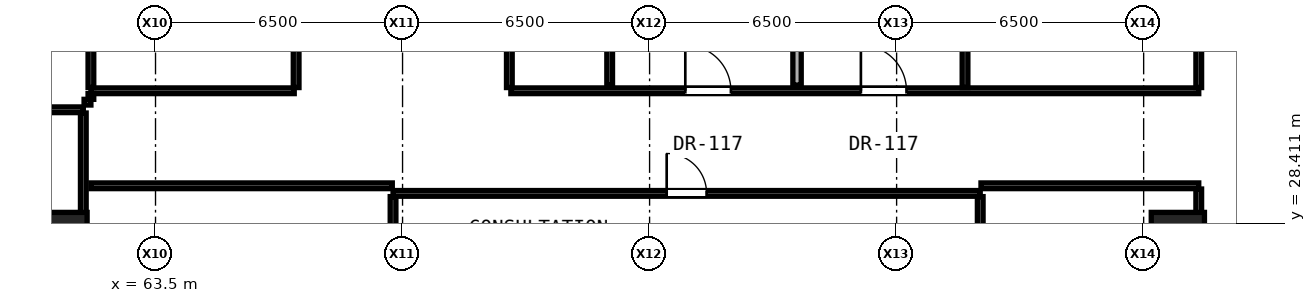
"""IFC4 building model, lengths in metres.
Left out: names, types, materials, properties, quantities, classifications, styles, units other than length and angle.
Written with IfcOpenShell. Run it as: python <this file> out.ifc"""

import sys

from ifc_helpers import new_model, si_unit, direction, frame, frame_2d, origin, origin_2d, place, context, subcontext, project, spatial, rectangle, hollow_rectangle, extrude, element, fill, save


model = new_model("IFC4")
c1 = context("Model", 3, precision=1e-05, world=origin(), true_north=direction((0.0, 1.0)))
c2 = subcontext(c1, "Body", "Model", "MODEL_VIEW")
j1 = project(units=[si_unit("LENGTHUNIT", "METRE"), si_unit("PLANEANGLEUNIT", "RADIAN")], contexts=[c1])
p1 = place(None, origin())
s1 = spatial("IfcSite", under=j1, at=p1, CompositionType="ELEMENT")
p2 = place(p1, origin())
s2 = spatial("IfcBuilding", under=s1, at=p2, CompositionType="ELEMENT")
p3 = place(p2, frame((0.0, 0.0, 18.1)))
s3 = spatial("IfcBuildingStorey", under=s2, at=p3, CompositionType="ELEMENT", Elevation=18.1)
for number, where, z_axis, x_axis in (
    (1, (61.0, 28.0, 0.0), (0.0, 0.0, 1.0), (1.0, 0.0, 0.0)),
    (2, (90.4, 28.0, 0.0), (0.0, 0.0, 1.0), (1.0, 0.0, 0.0)),
):
    element("IfcColumn", number, at=place(p3, frame(where, z_axis=z_axis, x_axis=x_axis)), inside=s3, PredefinedType="COLUMN", context=c2, shape_type="SweptSolid", body=[
        extrude(hollow_rectangle(XDim=1.4, YDim=1.4, WallThickness=0.08, at=origin_2d()), origin(), (0.0, 0.0, 1.0), 4.3),
    ])
p4 = place(p3, frame((69.75, 29.2, 0.0), z_axis=(0.0, 0.0, 1.0), x_axis=(1.0, 0.0, 0.0)))
e3 = element("IfcWall", 3, at=p4, inside=s3, PredefinedType="PARTITIONING", context=c2, shape_type="SweptSolid", body=[
    extrude(rectangle(XDim=15.45, YDim=0.15, at=frame_2d((7.725, 0.0))), origin(), (0.0, 0.0, 1.0), 2.715),
])
p5 = place(p4, frame((7.2, 0.0, 0.0)))
e4 = element("IfcOpeningElement", 4, at=p5, cuts=e3, PredefinedType="OPENING", context=c2, shape_type="SweptSolid", body=[
    extrude(rectangle(XDim=1.05, YDim=2.2, at=frame_2d((0.525, 1.1))), frame((0.0, 0.085, 0.0), z_axis=(0.0, -1.0, 0.0), x_axis=(1.0, 0.0, 0.0)), (0.0, 0.0, 1.0), 0.17),
])
p6 = place(p3, frame((61.8, 29.4, 0.0), z_axis=(0.0, 0.0, 1.0), x_axis=(1.0, 0.0, 0.0)))
e5 = element("IfcWall", 5, at=p6, inside=s3, PredefinedType="PARTITIONING", context=c2, shape_type="SweptSolid", body=[
    extrude(rectangle(XDim=7.93, YDim=0.15, at=frame_2d((3.965, 0.0))), origin(), (0.0, 0.0, 1.0), 2.715),
])
p7 = place(p3, frame((85.22, 29.4, 0.0), z_axis=(0.0, 0.0, 1.0), x_axis=(1.0, 0.0, 0.0)))
e6 = element("IfcWall", 6, at=p7, inside=s3, PredefinedType="PARTITIONING", context=c2, shape_type="SweptSolid", body=[
    extrude(rectangle(XDim=5.73, YDim=0.15, at=frame_2d((2.865, 0.0))), origin(), (0.0, 0.0, 1.0), 2.786),
])
p8 = place(p3, frame((54.0, 31.4, 0.0), z_axis=(0.0, 0.0, 1.0), x_axis=(1.0, 0.0, 0.0)))
e7 = element("IfcWall", 7, at=p8, inside=s3, PredefinedType="PARTITIONING", context=c2, shape_type="SweptSolid", body=[
    extrude(rectangle(XDim=7.6, YDim=0.15, at=frame_2d((3.8, 0.0))), origin(), (0.0, 0.0, 1.0), 2.602),
])
p9 = place(p8, frame((3.2, 0.0, 0.0)))
e8 = element("IfcOpeningElement", 8, at=p9, cuts=e7, PredefinedType="OPENING", context=c2, shape_type="SweptSolid", body=[
    extrude(rectangle(XDim=1.2, YDim=2.25, at=frame_2d((0.6, 1.125))), frame((0.0, 0.085, 0.0), z_axis=(0.0, -1.0, 0.0), x_axis=(1.0, 0.0, 0.0)), (0.0, 0.0, 1.0), 0.17),
])
p10 = place(p3, frame((61.62, 31.6, 0.0), z_axis=(0.0, 0.0, 1.0), x_axis=(1.0, 0.0, 0.0)))
e9 = element("IfcWall", 9, at=p10, inside=s3, PredefinedType="PARTITIONING", context=c2, shape_type="SweptSolid", body=[
    extrude(rectangle(XDim=0.18, YDim=0.15, at=frame_2d((0.09, 0.0))), origin(), (0.0, 0.0, 1.0), 3.65),
])
p11 = place(p3, frame((61.8, 31.9, 0.0), z_axis=(0.0, 0.0, 1.0), x_axis=(1.0, 0.0, 0.0)))
e10 = element("IfcWall", 10, at=p11, inside=s3, PredefinedType="PARTITIONING", context=c2, shape_type="SweptSolid", body=[
    extrude(rectangle(XDim=5.35, YDim=0.15, at=frame_2d((2.675, 0.0))), origin(), (0.0, 0.0, 1.0), 3.65),
])
p12 = place(p3, frame((72.85, 31.9, 0.0), z_axis=(0.0, 0.0, 1.0), x_axis=(1.0, 0.0, 0.0)))
e11 = element("IfcWall", 11, at=p12, inside=s3, PredefinedType="PARTITIONING", context=c2, shape_type="SweptSolid", body=[
    extrude(rectangle(XDim=18.1, YDim=0.15, at=frame_2d((9.05, 0.0))), origin(), (0.0, 0.0, 1.0), 2.715),
])
p13 = place(p12, frame((9.21, 0.0, 0.0)))
e12 = element("IfcOpeningElement", 12, at=p13, cuts=e11, PredefinedType="OPENING", context=c2, shape_type="SweptSolid", body=[
    extrude(rectangle(XDim=1.2, YDim=2.25, at=frame_2d((0.6, 1.125))), frame((0.0, 0.085, 0.0), z_axis=(0.0, -1.0, 0.0), x_axis=(1.0, 0.0, 0.0)), (0.0, 0.0, 1.0), 0.17),
])
p14 = place(p12, frame((4.59, 0.0, 0.0)))
e13 = element("IfcOpeningElement", 13, at=p14, cuts=e11, PredefinedType="OPENING", context=c2, shape_type="SweptSolid", body=[
    extrude(rectangle(XDim=1.2, YDim=2.25, at=frame_2d((0.6, 1.125))), frame((0.0, 0.085, 0.0), z_axis=(0.0, -1.0, 0.0), x_axis=(1.0, 0.0, 0.0)), (0.0, 0.0, 1.0), 0.17),
])
p15 = place(p3, frame((61.6, 23.46, 0.0), z_axis=(0.0, 0.0, 1.0), x_axis=(0.0, 1.0, 0.0)))
e14 = element("IfcWall", 14, at=p15, inside=s3, PredefinedType="PARTITIONING", context=c2, shape_type="SweptSolid", body=[
    extrude(rectangle(XDim=7.855, YDim=0.15, at=frame_2d((3.927, 0.0))), origin(), (0.0, 0.0, 1.0), 2.869),
])
p16 = place(p3, frame((61.8, 31.675, 0.0), z_axis=(0.0, 0.0, 1.0), x_axis=(0.0, 1.0, 0.0)))
e15 = element("IfcWall", 15, at=p16, inside=s3, PredefinedType="PARTITIONING", context=c2, shape_type="SweptSolid", body=[
    extrude(rectangle(XDim=0.15, YDim=0.15, at=frame_2d((0.075, 0.0))), origin(), (0.0, 0.0, 1.0), 3.65),
])
p17 = place(p3, frame((61.8, 31.985, 0.0), z_axis=(0.0, 0.0, 1.0), x_axis=(0.0, 1.0, 0.0)))
e16 = element("IfcWall", 16, at=p17, inside=s3, PredefinedType="PARTITIONING", context=c2, shape_type="SweptSolid", body=[
    extrude(rectangle(XDim=2.03, YDim=0.15, at=frame_2d((1.015, 0.0))), origin(), (0.0, 0.0, 1.0), 3.65),
])
p18 = place(p3, frame((67.2, 31.985, 0.0), z_axis=(0.0, 0.0, 1.0), x_axis=(0.0, 1.0, 0.0)))
e17 = element("IfcWall", 17, at=p18, inside=s3, PredefinedType="PARTITIONING", context=c2, shape_type="SweptSolid", body=[
    extrude(rectangle(XDim=3.215, YDim=0.15, at=frame_2d((1.607, 0.0))), origin(), (0.0, 0.0, 1.0), 2.542),
])
p19 = place(p3, frame((69.75, 26.617, 0.0), z_axis=(0.0, 0.0, 1.0), x_axis=(0.0, 1.0, 0.0)))
e18 = element("IfcWall", 18, at=p19, inside=s3, PredefinedType="PARTITIONING", context=c2, shape_type="SweptSolid", body=[
    extrude(rectangle(XDim=2.498, YDim=0.15, at=frame_2d((1.249, 0.0))), origin(), (0.0, 0.0, 1.0), 2.715),
])
p20 = place(p3, frame((72.81, 31.985, 0.0), z_axis=(0.0, 0.0, 1.0), x_axis=(0.0, 1.0, 0.0)))
e19 = element("IfcWall", 19, at=p20, inside=s3, PredefinedType="PARTITIONING", context=c2, shape_type="SweptSolid", body=[
    extrude(rectangle(XDim=2.845, YDim=0.15, at=frame_2d((1.422, 0.0))), origin(), (0.0, 0.0, 1.0), 3.65),
])
p21 = place(p20, frame((1.01, 0.0, 0.0)))
e20 = element("IfcOpeningElement", 20, at=p21, cuts=e19, PredefinedType="OPENING", context=c2, shape_type="SweptSolid", body=[
    extrude(rectangle(XDim=0.85, YDim=2.01, at=frame_2d((0.425, 1.005))), frame((0.0, 0.085, 0.0), z_axis=(0.0, -1.0, 0.0), x_axis=(1.0, 0.0, 0.0)), (0.0, 0.0, 1.0), 0.17),
])
p22 = place(p3, frame((75.45, 32.05, 0.0), z_axis=(0.0, 0.0, 1.0), x_axis=(0.0, 1.0, 0.0)))
e21 = element("IfcWall", 21, at=p22, inside=s3, PredefinedType="PARTITIONING", context=c2, shape_type="SweptSolid", body=[
    extrude(rectangle(XDim=2.78, YDim=0.15, at=frame_2d((1.39, 0.0))), origin(), (0.0, 0.0, 1.0), 3.65),
])
p23 = place(p3, frame((80.38, 32.05, 0.0), z_axis=(0.0, 0.0, 1.0), x_axis=(0.0, 1.0, 0.0)))
e22 = element("IfcWall", 22, at=p23, inside=s3, PredefinedType="SOLIDWALL", context=c2, shape_type="SweptSolid", body=[
    extrude(rectangle(XDim=2.78, YDim=0.22, at=frame_2d((1.39, 0.0))), origin(), (0.0, 0.0, 1.0), 3.65),
])
p24 = place(p3, frame((84.8, 31.985, 0.0), z_axis=(0.0, 0.0, 1.0), x_axis=(0.0, 1.0, 0.0)))
e23 = element("IfcWall", 23, at=p24, inside=s3, PredefinedType="PARTITIONING", context=c2, shape_type="SweptSolid", body=[
    extrude(rectangle(XDim=2.845, YDim=0.15, at=frame_2d((1.422, 0.0))), origin(), (0.0, 0.0, 1.0), 2.715),
])
p25 = place(p3, frame((85.2, 26.617, 0.0), z_axis=(0.0, 0.0, 1.0), x_axis=(0.0, 1.0, 0.0)))
e24 = element("IfcWall", 24, at=p25, inside=s3, PredefinedType="PARTITIONING", context=c2, shape_type="SweptSolid", body=[
    extrude(rectangle(XDim=2.498, YDim=0.15, at=frame_2d((1.249, 0.0))), origin(), (0.0, 0.0, 1.0), 2.715),
])
p26 = place(p3, frame((90.95, 23.285, 0.0), z_axis=(0.0, 0.0, 1.0), x_axis=(0.0, 1.0, 0.0)))
e25 = element("IfcWall", 25, at=p26, inside=s3, PredefinedType="PARTITIONING", context=c2, shape_type="SweptSolid", body=[
    extrude(rectangle(XDim=6.03, YDim=0.15, at=frame_2d((3.015, 0.0))), origin(), (0.0, 0.0, 1.0), 2.869),
])
p27 = place(p3, frame((90.95, 31.985, 0.0), z_axis=(0.0, 0.0, 1.0), x_axis=(0.0, 1.0, 0.0)))
e26 = element("IfcWall", 26, at=p27, inside=s3, PredefinedType="PARTITIONING", context=c2, shape_type="SweptSolid", body=[
    extrude(rectangle(XDim=14.13, YDim=0.15, at=frame_2d((7.065, 0.0))), origin(), (0.0, 0.0, 1.0), 2.786),
])
p28 = place(p13, origin())
e27 = element("IfcDoor", 27, at=p28, inside=s3, OperationType="SINGLE_SWING_LEFT", PredefinedType="DOOR", context=c2, shape_type="SweptSolid", body=[
    extrude(rectangle(XDim=1.2, YDim=2.25, at=frame_2d((0.6, 1.125))), frame((0.0, 0.025, 0.0), z_axis=(0.0, -1.0, 0.0), x_axis=(1.0, 0.0, 0.0)), (0.0, 0.0, 1.0), 0.05),
])
fill(e12, e27)
p29 = place(p14, origin())
e28 = element("IfcDoor", 28, at=p29, inside=s3, OperationType="SINGLE_SWING_LEFT", PredefinedType="DOOR", context=c2, shape_type="SweptSolid", body=[
    extrude(rectangle(XDim=1.2, YDim=2.25, at=frame_2d((0.6, 1.125))), frame((0.0, 0.025, 0.0), z_axis=(0.0, -1.0, 0.0), x_axis=(1.0, 0.0, 0.0)), (0.0, 0.0, 1.0), 0.05),
])
fill(e13, e28)
p30 = place(p5, origin())
e29 = element("IfcDoor", 29, at=p30, inside=s3, OperationType="SINGLE_SWING_LEFT", PredefinedType="DOOR", context=c2, shape_type="SweptSolid", body=[
    extrude(rectangle(XDim=1.05, YDim=2.2, at=frame_2d((0.525, 1.1))), frame((0.0, 0.025, 0.0), z_axis=(0.0, -1.0, 0.0), x_axis=(1.0, 0.0, 0.0)), (0.0, 0.0, 1.0), 0.05),
])
fill(e4, e29)
save(model, sys.argv[1])
